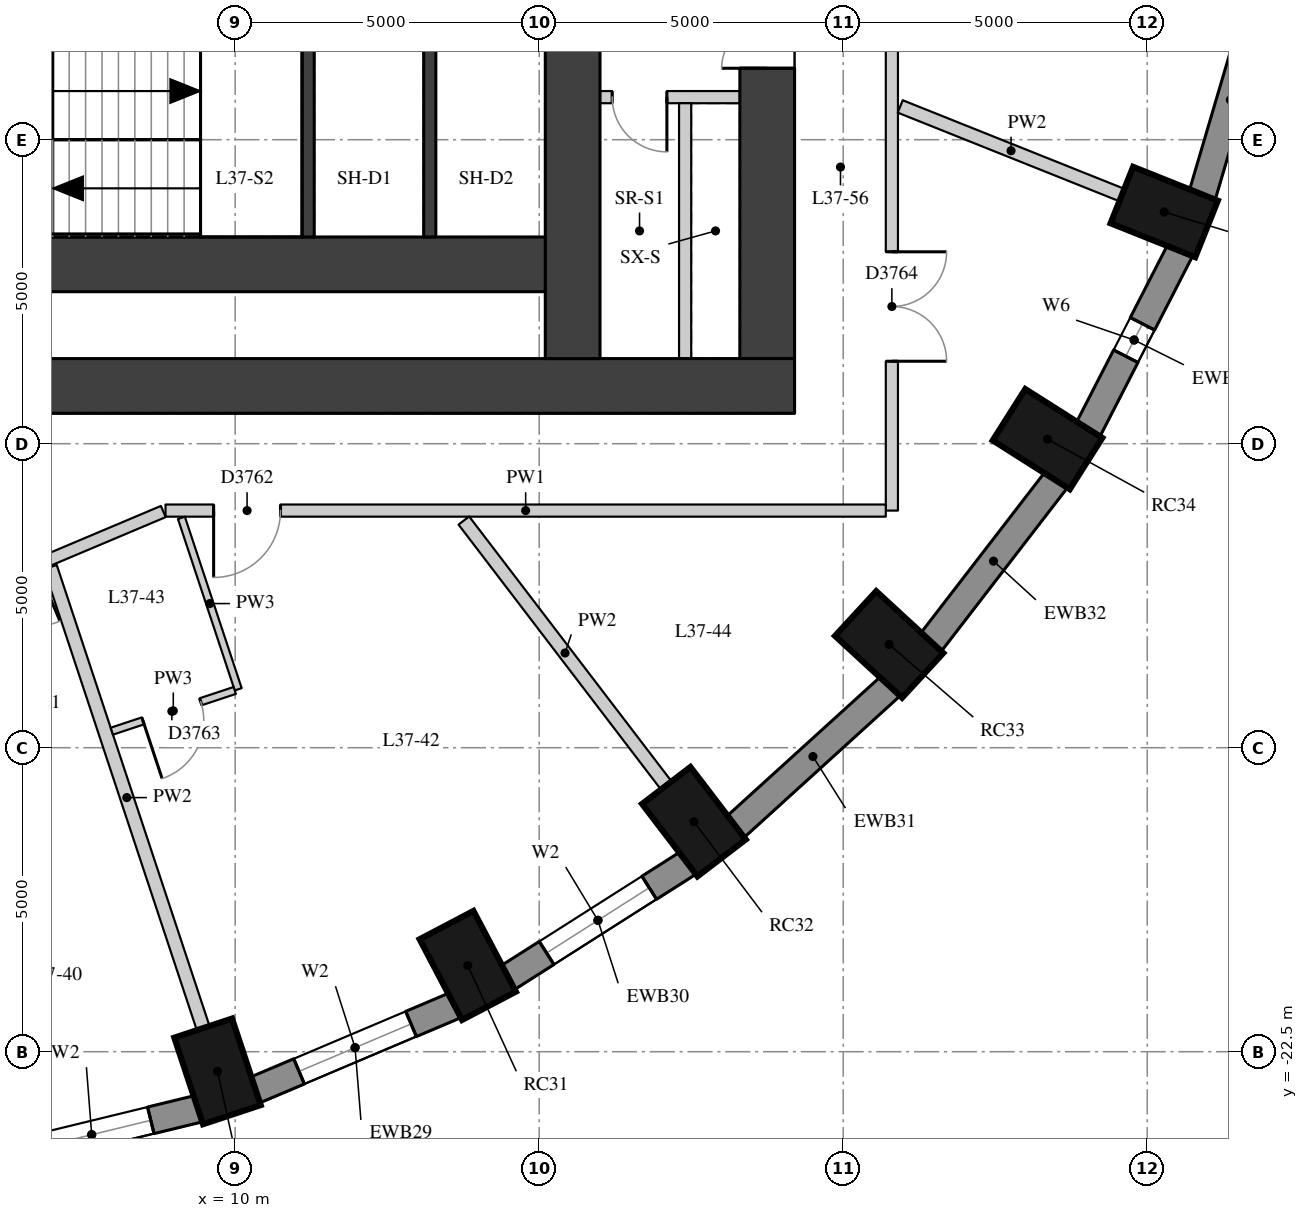
"""IFC4 building model, lengths in metres.
Left out: names, types, materials, properties, quantities, classifications, styles, units other than length and angle.
Written with IfcOpenShell. Run it as: python <this file> out.ifc"""

import sys

from ifc_helpers import new_model, si_unit, direction, frame, frame_2d, origin, origin_2d, place, context, subcontext, project, spatial, rectangle, extrude, element, fill, save


model = new_model("IFC4")
c1 = context("Model", 3, precision=1e-05, world=origin(), true_north=direction((0.0, 1.0)))
c2 = subcontext(c1, "Body", "Model", "MODEL_VIEW")
j1 = project(units=[si_unit("LENGTHUNIT", "METRE"), si_unit("PLANEANGLEUNIT", "RADIAN")], contexts=[c1])
p1 = place(None, origin())
s1 = spatial("IfcSite", under=j1, at=p1, CompositionType="ELEMENT")
p2 = place(p1, origin())
s2 = spatial("IfcBuilding", under=s1, at=p2, CompositionType="ELEMENT")
p3 = place(p2, frame((0.0, 0.0, 131.8)))
s3 = spatial("IfcBuildingStorey", under=s2, at=p3, CompositionType="ELEMENT", Elevation=131.8)
for number, where, z_axis, x_axis in (
    (1, (9.71, -22.824, 0.0), (0.0, 0.0, 1.0), (0.315, -0.949, 0.0)),
    (2, (13.825, -21.082, 0.0), (0.0, 0.0, 1.0), (0.465, -0.885, 0.0)),
    (3, (17.545, -18.717, 0.0), (0.0, 0.0, 1.0), (0.607, -0.795, 0.0)),
    (4, (20.755, -15.802, 0.0), (0.0, 0.0, 1.0), (0.735, -0.678, 0.0)),
    (5, (23.36, -12.425, 0.0), (0.0, 0.0, 1.0), (0.845, -0.536, 0.0)),
    (6, (25.279, -8.689, 0.0), (0.0, 0.0, 1.0), (0.929, -0.371, 0.0)),
):
    element("IfcColumn", number, at=place(p3, frame(where, z_axis=z_axis, x_axis=x_axis)), inside=s3, PredefinedType="COLUMN", context=c2, shape_type="SweptSolid", body=[
        extrude(rectangle(XDim=1.5, YDim=1.0, at=origin_2d()), origin(), (0.0, 0.0, 1.0), 3.3),
    ])
p4 = place(p3, frame((5.875, -24.294, 0.0), z_axis=(0.0, 0.0, 1.0), x_axis=(0.971667603162, 0.236351579148, 0.0)))
e7 = element("IfcWall", 7, at=p4, inside=s3, PredefinedType="SOLIDWALL", context=c2, shape_type="SweptSolid", body=[
    extrude(rectangle(XDim=3.635, YDim=0.45, at=frame_2d((1.817, 0.0))), origin(), (0.0, 0.0, 1.0), 2.85),
])
p5 = place(p4, frame((0.817, 0.0, 0.4)))
e8 = element("IfcOpeningElement", 8, at=p5, cuts=e7, PredefinedType="OPENING", context=c2, shape_type="SweptSolid", body=[
    extrude(rectangle(XDim=2.0, YDim=1.75, at=frame_2d((1.0, 0.875))), frame((0.0, 0.235, 0.0), z_axis=(0.0, -1.0, 0.0), x_axis=(1.0, 0.0, 0.0)), (0.0, 0.0, 1.0), 0.47),
])
p6 = place(p3, frame((10.318, -23.134, 0.0), z_axis=(0.0, 0.0, 1.0), x_axis=(0.920869643542, 0.389870619055, 0.0)))
e9 = element("IfcWall", 9, at=p6, inside=s3, PredefinedType="SOLIDWALL", context=c2, shape_type="SweptSolid", body=[
    extrude(rectangle(XDim=3.591, YDim=0.45, at=frame_2d((1.796, 0.0))), origin(), (0.0, 0.0, 1.0), 2.85),
])
p7 = place(p6, frame((0.796, 0.0, 0.4)))
e10 = element("IfcOpeningElement", 10, at=p7, cuts=e9, PredefinedType="OPENING", context=c2, shape_type="SweptSolid", body=[
    extrude(rectangle(XDim=2.0, YDim=1.75, at=frame_2d((1.0, 0.875))), frame((0.0, 0.235, 0.0), z_axis=(0.0, -1.0, 0.0), x_axis=(1.0, 0.0, 0.0)), (0.0, 0.0, 1.0), 0.47),
])
p8 = place(p3, frame((14.475, -21.287, 0.0), z_axis=(0.0, 0.0, 1.0), x_axis=(0.843911841423, 0.536481876587, 0.0)))
e11 = element("IfcWall", 11, at=p8, inside=s3, PredefinedType="SOLIDWALL", context=c2, shape_type="SweptSolid", body=[
    extrude(rectangle(XDim=3.532, YDim=0.45, at=frame_2d((1.766, 0.0))), origin(), (0.0, 0.0, 1.0), 2.85),
])
p9 = place(p8, frame((0.766, 0.0, 0.4)))
e12 = element("IfcOpeningElement", 12, at=p9, cuts=e11, PredefinedType="OPENING", context=c2, shape_type="SweptSolid", body=[
    extrude(rectangle(XDim=2.0, YDim=1.75, at=frame_2d((1.0, 0.875))), frame((0.0, 0.235, 0.0), z_axis=(0.0, -1.0, 0.0), x_axis=(1.0, 0.0, 0.0)), (0.0, 0.0, 1.0), 0.47),
])
p10 = place(p3, frame((18.219, -18.81, 0.0), z_axis=(0.0, 0.0, 1.0), x_axis=(0.740364106106, 0.672206062446, 0.0)))
e13 = element("IfcWall", 13, at=p10, inside=s3, PredefinedType="SOLIDWALL", context=c2, shape_type="SweptSolid", body=[
    extrude(rectangle(XDim=3.464, YDim=0.45, at=frame_2d((1.732, 0.0))), origin(), (0.0, 0.0, 1.0), 2.85),
])
p11 = place(p3, frame((21.435, -15.775, 0.0), z_axis=(0.0, 0.0, 1.0), x_axis=(0.610693945156, 0.791866721961, 0.0)))
e14 = element("IfcWall", 14, at=p11, inside=s3, PredefinedType="SOLIDWALL", context=c2, shape_type="SweptSolid", body=[
    extrude(rectangle(XDim=3.395, YDim=0.45, at=frame_2d((1.697, 0.0))), origin(), (0.0, 0.0, 1.0), 2.85),
])
p12 = place(p3, frame((24.023, -12.277, 0.0), z_axis=(0.0, 0.0, 1.0), x_axis=(0.456828186229, 0.889554949549, 0.0)))
e15 = element("IfcWall", 15, at=p12, inside=s3, PredefinedType="SOLIDWALL", context=c2, shape_type="SweptSolid", body=[
    extrude(rectangle(XDim=3.333, YDim=0.45, at=frame_2d((1.667, 0.0))), origin(), (0.0, 0.0, 1.0), 2.85),
])
p13 = place(p12, frame((1.366, 0.0, 0.4)))
e16 = element("IfcOpeningElement", 16, at=p13, cuts=e15, PredefinedType="OPENING", context=c2, shape_type="SweptSolid", body=[
    extrude(rectangle(XDim=0.6, YDim=1.75, at=frame_2d((0.3, 0.875))), frame((0.0, 0.235, 0.0), z_axis=(0.0, -1.0, 0.0), x_axis=(1.0, 0.0, 0.0)), (0.0, 0.0, 1.0), 0.47),
])
p14 = place(p3, frame((25.902, -8.421, 0.0), z_axis=(0.0, 0.0, 1.0), x_axis=(0.282982737009, 0.95912500257, 0.0)))
e17 = element("IfcWall", 17, at=p14, inside=s3, PredefinedType="SOLIDWALL", context=c2, shape_type="SweptSolid", body=[
    extrude(rectangle(XDim=3.286, YDim=0.45, at=frame_2d((1.643, 0.0))), origin(), (0.0, 0.0, 1.0), 2.85),
])
p15 = place(p3, frame((18.75, -11.1, 0.0), z_axis=(0.0, 0.0, 1.0), x_axis=(0.0, 1.0, 0.0)))
e18 = element("IfcWall", 18, at=p15, inside=s3, PredefinedType="SHEAR", context=c2, shape_type="SweptSolid", body=[
    extrude(rectangle(XDim=22.2, YDim=0.9, at=frame_2d((11.1, 0.0))), origin(), (0.0, 0.0, 1.0), 2.85),
])
p16 = place(p15, frame((15.675, 0.0, 0.0)))
e19 = element("IfcOpeningElement", 19, at=p16, cuts=e18, PredefinedType="OPENING", context=c2, shape_type="SweptSolid", body=[
    extrude(rectangle(XDim=1.5, YDim=2.1, at=frame_2d((0.75, 1.05))), frame((0.0, 0.46, 0.0), z_axis=(0.0, -1.0, 0.0), x_axis=(1.0, 0.0, 0.0)), (0.0, 0.0, 1.0), 0.92),
])
p17 = place(p15, frame((4.775, 0.0, 0.0)))
e20 = element("IfcOpeningElement", 20, at=p17, cuts=e18, PredefinedType="OPENING", context=c2, shape_type="SweptSolid", body=[
    extrude(rectangle(XDim=1.5, YDim=2.1, at=frame_2d((0.75, 1.05))), frame((0.0, 0.46, 0.0), z_axis=(0.0, -1.0, 0.0), x_axis=(1.0, 0.0, 0.0)), (0.0, 0.0, 1.0), 0.92),
])
p18 = place(p3, frame((4.0, -11.55, 0.0), z_axis=(0.0, 0.0, 1.0), x_axis=(1.0, 0.0, 0.0)))
e21 = element("IfcWall", 21, at=p18, inside=s3, PredefinedType="SHEAR", context=c2, shape_type="SweptSolid", body=[
    extrude(rectangle(XDim=15.2, YDim=0.9, at=frame_2d((7.6, 0.0))), origin(), (0.0, 0.0, 1.0), 2.85),
])
p19 = place(p3, frame((15.55, -11.1, 0.0), z_axis=(0.0, 0.0, 1.0), x_axis=(0.0, 1.0, 0.0)))
e22 = element("IfcWall", 22, at=p19, inside=s3, PredefinedType="SHEAR", context=c2, shape_type="SweptSolid", body=[
    extrude(rectangle(XDim=22.2, YDim=0.9, at=frame_2d((11.1, 0.0))), origin(), (0.0, 0.0, 1.0), 2.85),
])
p20 = place(p19, frame((15.6, 0.0, 0.0)))
e23 = element("IfcOpeningElement", 23, at=p20, cuts=e22, PredefinedType="OPENING", context=c2, shape_type="SweptSolid", body=[
    extrude(rectangle(XDim=1.0, YDim=2.1, at=frame_2d((0.5, 1.05))), frame((0.0, 0.46, 0.0), z_axis=(0.0, -1.0, 0.0), x_axis=(1.0, 0.0, 0.0)), (0.0, 0.0, 1.0), 0.92),
])
p21 = place(p19, frame((5.6, 0.0, 0.0)))
e24 = element("IfcOpeningElement", 24, at=p21, cuts=e22, PredefinedType="OPENING", context=c2, shape_type="SweptSolid", body=[
    extrude(rectangle(XDim=1.0, YDim=2.1, at=frame_2d((0.5, 1.05))), frame((0.0, 0.46, 0.0), z_axis=(0.0, -1.0, 0.0), x_axis=(1.0, 0.0, 0.0)), (0.0, 0.0, 1.0), 0.92),
])
p22 = place(p3, frame((4.9, -9.55, 0.0), z_axis=(0.0, 0.0, 1.0), x_axis=(1.0, 0.0, 0.0)))
e25 = element("IfcWall", 25, at=p22, inside=s3, PredefinedType="SHEAR", context=c2, shape_type="SweptSolid", body=[
    extrude(rectangle(XDim=10.2, YDim=0.9, at=frame_2d((5.1, 0.0))), origin(), (0.0, 0.0, 1.0), 2.85),
])
for number, where, z_axis, x_axis in (
    (26, (11.2, -9.1, 0.0), (0.0, 0.0, 1.0), (0.0, 1.0, 0.0)),
    (27, (13.2, -9.1, 0.0), (0.0, 0.0, 1.0), (0.0, 1.0, 0.0)),
):
    element("IfcWall", number, at=place(p3, frame(where, z_axis=z_axis, x_axis=x_axis)), inside=s3, PredefinedType="SHEAR", context=c2, shape_type="SweptSolid", body=[
        extrude(rectangle(XDim=3.2, YDim=0.2, at=frame_2d((1.6, 0.0))), origin(), (0.0, 0.0, 1.0), 2.85),
    ])
p23 = place(p3, frame((16.0, -6.8, 0.0), z_axis=(0.0, 0.0, 1.0), x_axis=(1.0, 0.0, 0.0)))
e28 = element("IfcWall", 28, at=p23, inside=s3, PredefinedType="PARTITIONING", context=c2, shape_type="SweptSolid", body=[
    extrude(rectangle(XDim=2.3, YDim=0.2, at=frame_2d((1.15, 0.0))), origin(), (0.0, 0.0, 1.0), 2.85),
])
p24 = place(p23, frame((0.2, 0.0, 0.0)))
e29 = element("IfcOpeningElement", 29, at=p24, cuts=e28, PredefinedType="OPENING", context=c2, shape_type="SweptSolid", body=[
    extrude(rectangle(XDim=0.9, YDim=2.1, at=frame_2d((0.45, 1.05))), frame((0.0, 0.11, 0.0), z_axis=(0.0, -1.0, 0.0), x_axis=(1.0, 0.0, 0.0)), (0.0, 0.0, 1.0), 0.22),
])
p25 = place(p3, frame((17.4, -11.1, 0.0), z_axis=(0.0, 0.0, 1.0), x_axis=(0.0, 1.0, 0.0)))
e30 = element("IfcWall", 30, at=p25, inside=s3, PredefinedType="PARTITIONING", context=c2, shape_type="SweptSolid", body=[
    extrude(rectangle(XDim=4.2, YDim=0.2, at=frame_2d((2.1, 0.0))), origin(), (0.0, 0.0, 1.0), 2.85),
])
p26 = place(p3, frame((20.8, 13.5, 0.0), z_axis=(0.0, 0.0, 1.0), x_axis=(0.0, -1.0, 0.0)))
e31 = element("IfcWall", 31, at=p26, inside=s3, PredefinedType="PARTITIONING", context=c2, shape_type="SweptSolid", body=[
    extrude(rectangle(XDim=27.1, YDim=0.2, at=frame_2d((13.55, 0.0))), origin(), (0.0, 0.0, 1.0), 2.85),
])
p27 = place(p26, frame((22.844, 0.0, 0.0)))
e32 = element("IfcOpeningElement", 32, at=p27, cuts=e31, PredefinedType="OPENING", context=c2, shape_type="SweptSolid", body=[
    extrude(rectangle(XDim=1.8, YDim=2.1, at=frame_2d((0.9, 1.05))), frame((0.0, 0.11, 0.0), z_axis=(0.0, -1.0, 0.0), x_axis=(1.0, 0.0, 0.0)), (0.0, 0.0, 1.0), 0.22),
])
p28 = place(p26, frame((16.35, 0.0, 0.0)))
e33 = element("IfcOpeningElement", 33, at=p28, cuts=e31, PredefinedType="OPENING", context=c2, shape_type="SweptSolid", body=[
    extrude(rectangle(XDim=1.8, YDim=2.1, at=frame_2d((0.9, 1.05))), frame((0.0, 0.11, 0.0), z_axis=(0.0, -1.0, 0.0), x_axis=(1.0, 0.0, 0.0)), (0.0, 0.0, 1.0), 0.22),
])
p29 = place(p26, frame((10.051, 0.0, 0.0)))
e34 = element("IfcOpeningElement", 34, at=p29, cuts=e31, PredefinedType="OPENING", context=c2, shape_type="SweptSolid", body=[
    extrude(rectangle(XDim=1.8, YDim=2.1, at=frame_2d((0.9, 1.05))), frame((0.0, 0.11, 0.0), z_axis=(0.0, -1.0, 0.0), x_axis=(1.0, 0.0, 0.0)), (0.0, 0.0, 1.0), 0.22),
])
p30 = place(p3, frame((20.7, -13.6, 0.0), z_axis=(0.0, 0.0, 1.0), x_axis=(-1.0, 0.0, 0.0)))
e35 = element("IfcWall", 35, at=p30, inside=s3, PredefinedType="PARTITIONING", context=c2, shape_type="SweptSolid", body=[
    extrude(rectangle(XDim=11.845, YDim=0.2, at=frame_2d((5.923, 0.0))), origin(), (0.0, 0.0, 1.0), 2.85),
])
p31 = place(p30, frame((9.954, 0.0, 0.0)))
e36 = element("IfcOpeningElement", 36, at=p31, cuts=e35, PredefinedType="OPENING", context=c2, shape_type="SweptSolid", body=[
    extrude(rectangle(XDim=1.1, YDim=2.1, at=frame_2d((0.55, 1.05))), frame((0.0, 0.11, 0.0), z_axis=(0.0, -1.0, 0.0), x_axis=(1.0, 0.0, 0.0)), (0.0, 0.0, 1.0), 0.22),
])
p32 = place(p3, frame((8.818, -13.616, 0.0), z_axis=(0.0, 0.0, 1.0), x_axis=(-0.921304705085, -0.388841407759, 0.0)))
e37 = element("IfcWall", 37, at=p32, inside=s3, PredefinedType="PARTITIONING", context=c2, shape_type="SweptSolid", body=[
    extrude(rectangle(XDim=5.217, YDim=0.2, at=frame_2d((2.608, 0.0))), origin(), (0.0, 0.0, 1.0), 2.85),
])
p33 = place(p32, frame((2.266, 0.0, 0.0)))
e38 = element("IfcOpeningElement", 38, at=p33, cuts=e37, PredefinedType="OPENING", context=c2, shape_type="SweptSolid", body=[
    extrude(rectangle(XDim=1.0, YDim=2.1, at=frame_2d((0.5, 1.05))), frame((0.0, 0.11, 0.0), z_axis=(0.0, -1.0, 0.0), x_axis=(1.0, 0.0, 0.0)), (0.0, 0.0, 1.0), 0.22),
])
p34 = place(p3, frame((9.474, -22.112, 0.0), z_axis=(0.0, 0.0, 1.0), x_axis=(-0.314540101072, 0.949244186086, 0.0)))
e39 = element("IfcWall", 39, at=p34, inside=s3, PredefinedType="PARTITIONING", context=c2, shape_type="SweptSolid", body=[
    extrude(rectangle(XDim=7.988, YDim=0.22, at=frame_2d((3.994, 0.0))), origin(), (0.0, 0.0, 1.0), 2.85),
])
p35 = place(p3, frame((17.089, -18.121, 0.0), z_axis=(0.0, 0.0, 1.0), x_axis=(-0.607064955951, 0.794652212767, 0.0)))
e40 = element("IfcWall", 40, at=p35, inside=s3, PredefinedType="PARTITIONING", context=c2, shape_type="SweptSolid", body=[
    extrude(rectangle(XDim=5.483, YDim=0.22, at=frame_2d((2.742, 0.0))), origin(), (0.0, 0.0, 1.0), 2.85),
])
p36 = place(p3, frame((24.583, -8.41, 0.0), z_axis=(0.0, 0.0, 1.0), x_axis=(-0.928528147853, 0.371262008083, 0.0)))
e41 = element("IfcWall", 41, at=p36, inside=s3, PredefinedType="PARTITIONING", context=c2, shape_type="SweptSolid", body=[
    extrude(rectangle(XDim=3.926, YDim=0.22, at=frame_2d((1.963, 0.0))), origin(), (0.0, 0.0, 1.0), 2.85),
])
p37 = place(p3, frame((9.116, -13.719, 0.0), z_axis=(0.0, 0.0, 1.0), x_axis=(0.314476938086, -0.949265113344, 0.0)))
e42 = element("IfcWall", 42, at=p37, inside=s3, PredefinedType="PARTITIONING", context=c2, shape_type="SweptSolid", body=[
    extrude(rectangle(XDim=2.971, YDim=0.12, at=frame_2d((1.485, 0.0))), origin(), (0.0, 0.0, 1.0), 2.85),
])
p38 = place(p3, frame((9.993, -16.559, 0.0), z_axis=(0.0, 0.0, 1.0), x_axis=(-0.94926636949, -0.314473146318, 0.0)))
e43 = element("IfcWall", 43, at=p38, inside=s3, PredefinedType="PARTITIONING", context=c2, shape_type="SweptSolid", body=[
    extrude(rectangle(XDim=2.13, YDim=0.12, at=frame_2d((1.065, 0.0))), origin(), (0.0, 0.0, 1.0), 2.85),
])
p39 = place(p38, frame((0.59, 0.0, 0.0)))
e44 = element("IfcOpeningElement", 44, at=p39, cuts=e43, PredefinedType="OPENING", context=c2, shape_type="SweptSolid", body=[
    extrude(rectangle(XDim=1.0, YDim=2.1, at=frame_2d((0.5, 1.05))), frame((0.0, 0.07, 0.0), z_axis=(0.0, -1.0, 0.0), x_axis=(1.0, 0.0, 0.0)), (0.0, 0.0, 1.0), 0.14),
])
p40 = place(p5, origin())
e45 = element("IfcWindow", 45, at=p40, inside=s3, PartitioningType="SINGLE_PANEL", PredefinedType="WINDOW", context=c2, shape_type="SweptSolid", body=[
    extrude(rectangle(XDim=2.0, YDim=1.75, at=frame_2d((1.0, 0.875))), frame((0.0, 0.035, 0.0), z_axis=(0.0, -1.0, 0.0), x_axis=(1.0, 0.0, 0.0)), (0.0, 0.0, 1.0), 0.06),
])
fill(e8, e45)
p41 = place(p7, origin())
e46 = element("IfcWindow", 46, at=p41, inside=s3, PartitioningType="SINGLE_PANEL", PredefinedType="WINDOW", context=c2, shape_type="SweptSolid", body=[
    extrude(rectangle(XDim=2.0, YDim=1.75, at=frame_2d((1.0, 0.875))), frame((0.0, 0.035, 0.0), z_axis=(0.0, -1.0, 0.0), x_axis=(1.0, 0.0, 0.0)), (0.0, 0.0, 1.0), 0.06),
])
fill(e10, e46)
p42 = place(p9, origin())
e47 = element("IfcWindow", 47, at=p42, inside=s3, PartitioningType="SINGLE_PANEL", PredefinedType="WINDOW", context=c2, shape_type="SweptSolid", body=[
    extrude(rectangle(XDim=2.0, YDim=1.75, at=frame_2d((1.0, 0.875))), frame((0.0, 0.035, 0.0), z_axis=(0.0, -1.0, 0.0), x_axis=(1.0, 0.0, 0.0)), (0.0, 0.0, 1.0), 0.06),
])
fill(e12, e47)
p43 = place(p13, origin())
e48 = element("IfcWindow", 48, at=p43, inside=s3, PartitioningType="SINGLE_PANEL", PredefinedType="WINDOW", context=c2, shape_type="SweptSolid", body=[
    extrude(rectangle(XDim=0.6, YDim=1.75, at=frame_2d((0.3, 0.875))), frame((0.0, 0.035, 0.0), z_axis=(0.0, -1.0, 0.0), x_axis=(1.0, 0.0, 0.0)), (0.0, 0.0, 1.0), 0.06),
])
fill(e16, e48)
p44 = place(p17, origin())
e49 = element("IfcDoor", 49, at=p44, inside=s3, OperationType="DOUBLE_DOOR_SINGLE_SWING", PredefinedType="DOOR", context=c2, shape_type="SweptSolid", body=[
    extrude(rectangle(XDim=1.5, YDim=2.1, at=frame_2d((0.75, 1.05))), frame((0.0, 0.025, 0.0), z_axis=(0.0, -1.0, 0.0), x_axis=(1.0, 0.0, 0.0)), (0.0, 0.0, 1.0), 0.05),
])
fill(e20, e49)
p45 = place(p24, origin())
e50 = element("IfcDoor", 50, at=p45, inside=s3, OperationType="SINGLE_SWING_LEFT", PredefinedType="DOOR", context=c2, shape_type="SweptSolid", body=[
    extrude(rectangle(XDim=0.9, YDim=2.1, at=frame_2d((0.45, 1.05))), frame((0.0, 0.025, 0.0), z_axis=(0.0, -1.0, 0.0), x_axis=(1.0, 0.0, 0.0)), (0.0, 0.0, 1.0), 0.05),
])
fill(e29, e50)
p46 = place(p31, origin())
e51 = element("IfcDoor", 51, at=p46, inside=s3, OperationType="SINGLE_SWING_RIGHT", PredefinedType="DOOR", context=c2, shape_type="SweptSolid", body=[
    extrude(rectangle(XDim=1.1, YDim=2.1, at=frame_2d((0.55, 1.05))), frame((0.0, 0.025, 0.0), z_axis=(0.0, -1.0, 0.0), x_axis=(1.0, 0.0, 0.0)), (0.0, 0.0, 1.0), 0.05),
])
fill(e36, e51)
p47 = place(p39, origin())
e52 = element("IfcDoor", 52, at=p47, inside=s3, OperationType="SINGLE_SWING_RIGHT", PredefinedType="DOOR", context=c2, shape_type="SweptSolid", body=[
    extrude(rectangle(XDim=1.0, YDim=2.1, at=frame_2d((0.5, 1.05))), frame((0.0, 0.025, 0.0), z_axis=(0.0, -1.0, 0.0), x_axis=(1.0, 0.0, 0.0)), (0.0, 0.0, 1.0), 0.05),
])
fill(e44, e52)
p48 = place(p27, origin())
e53 = element("IfcDoor", 53, at=p48, inside=s3, OperationType="DOUBLE_DOOR_SINGLE_SWING", PredefinedType="DOOR", context=c2, shape_type="SweptSolid", body=[
    extrude(rectangle(XDim=1.8, YDim=2.1, at=frame_2d((0.9, 1.05))), frame((0.0, 0.025, 0.0), z_axis=(0.0, -1.0, 0.0), x_axis=(1.0, 0.0, 0.0)), (0.0, 0.0, 1.0), 0.05),
])
fill(e32, e53)
save(model, sys.argv[1])
